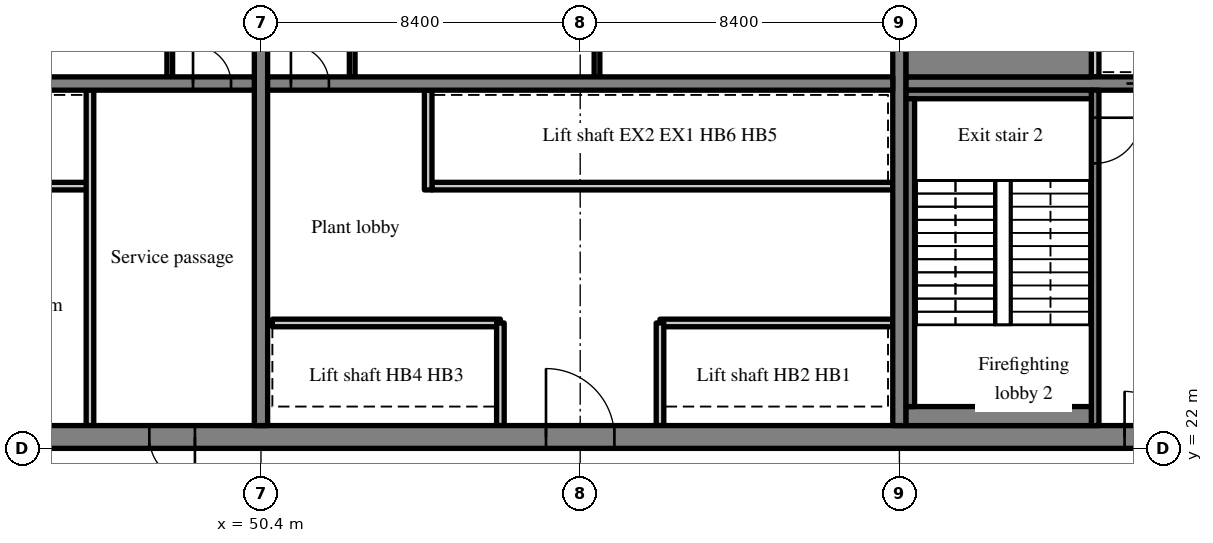
"""IFC4 building model, lengths in metres.
Left out: names, types, materials, properties, quantities, classifications, styles, units other than length and angle.
Written with IfcOpenShell. Run it as: python <this file> out.ifc"""

import sys

from ifc_helpers import new_model, si_unit, direction, frame, frame_2d, origin, place, context, subcontext, project, spatial, rectangle, extrude, source, transform, mapped, element, fill, save


model = new_model("IFC4")
c1 = context("Model", 3, precision=1e-05, world=origin(), true_north=direction((0.0, 1.0)))
c2 = subcontext(c1, "Body", "Model", "MODEL_VIEW")
j1 = project(units=[si_unit("LENGTHUNIT", "METRE"), si_unit("PLANEANGLEUNIT", "RADIAN")], contexts=[c1])
p1 = place(None, origin())
s1 = spatial("IfcSite", under=j1, at=p1, CompositionType="ELEMENT")
p2 = place(p1, origin())
s2 = spatial("IfcBuilding", under=s1, at=p2, CompositionType="ELEMENT")
p3 = place(p2, frame((0.0, 0.0, 264.7)))
s3 = spatial("IfcBuildingStorey", under=s2, at=p3, CompositionType="ELEMENT", Elevation=264.7)
m1 = source(origin(), c2, "Body", "SweptSolid", [
    extrude(rectangle(XDim=50.4, YDim=0.6, at=frame_2d((25.2, 0.0))), origin(), (0.0, 0.0, 1.0), 5.12),
])
p4 = place(p3, frame((25.2, 22.3, 0.0), z_axis=(0.0, 0.0, 1.0), x_axis=(1.0, 0.0, 0.0)))
e1 = element("IfcWall", 1, at=p4, inside=s3, PredefinedType="SHEAR", context=c2, shape_type="MappedRepresentation", body=[
    mapped(m1, transform((0.0, 0.0, 0.0), scale=1.0)),
])
m2 = source(origin(), c2, "Body", "SweptSolid", [
    extrude(rectangle(XDim=1.2, YDim=2.1, at=frame_2d((0.6, 1.05))), frame((0.0, 0.31, 0.0), z_axis=(0.0, -1.0, 0.0), x_axis=(1.0, 0.0, 0.0)), (0.0, 0.0, 1.0), 0.62),
])
p5 = place(p4, frame((22.262, 0.0, 0.0)))
e2 = element("IfcOpeningElement", 2, at=p5, cuts=e1, PredefinedType="OPENING", context=c2, shape_type="MappedRepresentation", body=[
    mapped(m2, transform((0.0, 0.0, 0.0), scale=1.0)),
])
m3 = source(origin(), c2, "Body", "SweptSolid", [
    extrude(rectangle(XDim=0.9, YDim=2.1, at=frame_2d((0.45, 1.05))), frame((0.0, 0.31, 0.0), z_axis=(0.0, -1.0, 0.0), x_axis=(1.0, 0.0, 0.0)), (0.0, 0.0, 1.0), 0.62),
])
p6 = place(p4, frame((17.25, 0.0, 0.0)))
e3 = element("IfcOpeningElement", 3, at=p6, cuts=e1, PredefinedType="OPENING", context=c2, shape_type="MappedRepresentation", body=[
    mapped(m3, transform((0.0, 0.0, 0.0), scale=1.0)),
])
p7 = place(p4, frame((9.656, 0.0, 0.0)))
e4 = element("IfcOpeningElement", 4, at=p7, cuts=e1, PredefinedType="OPENING", context=c2, shape_type="MappedRepresentation", body=[
    mapped(m3, transform((0.0, 0.0, 0.0), scale=1.0)),
])
p8 = place(p4, frame((12.719, 0.0, 0.0)))
e5 = element("IfcOpeningElement", 5, at=p8, cuts=e1, PredefinedType="OPENING", context=c2, shape_type="MappedRepresentation", body=[
    mapped(m3, transform((0.0, 0.0, 0.0), scale=1.0)),
])
m4 = source(origin(), c2, "Body", "SweptSolid", [
    extrude(rectangle(XDim=1.8, YDim=2.1, at=frame_2d((0.9, 1.05))), frame((0.0, 0.31, 0.0), z_axis=(0.0, -1.0, 0.0), x_axis=(1.0, 0.0, 0.0)), (0.0, 0.0, 1.0), 0.62),
])
p9 = place(p4, frame((32.7, 0.0, 0.0)))
e6 = element("IfcOpeningElement", 6, at=p9, cuts=e1, PredefinedType="OPENING", context=c2, shape_type="MappedRepresentation", body=[
    mapped(m4, transform((0.0, 0.0, 0.0), scale=1.0)),
])
p10 = place(p4, frame((6.488, 0.0, 0.0)))
e7 = element("IfcOpeningElement", 7, at=p10, cuts=e1, PredefinedType="OPENING", context=c2, shape_type="MappedRepresentation", body=[
    mapped(m2, transform((0.0, 0.0, 0.0), scale=1.0)),
])
p11 = place(p4, frame((47.925, 0.0, 0.0)))
e8 = element("IfcOpeningElement", 8, at=p11, cuts=e1, PredefinedType="OPENING", context=c2, shape_type="MappedRepresentation", body=[
    mapped(m2, transform((0.0, 0.0, 0.0), scale=1.0)),
])
m5 = source(origin(), c2, "Body", "SweptSolid", [
    extrude(rectangle(XDim=18.8, YDim=0.35, at=frame_2d((9.4, 0.0))), origin(), (0.0, 0.0, 1.0), 5.12),
])
p12 = place(p3, frame((50.4, 22.6, 0.0), z_axis=(0.0, 0.0, 1.0), x_axis=(0.0, 1.0, 0.0)))
e9 = element("IfcWall", 9, at=p12, inside=s3, PredefinedType="SHEAR", context=c2, shape_type="MappedRepresentation", body=[
    mapped(m5, transform((0.0, 0.0, 0.0), scale=1.0)),
])
m6 = source(origin(), c2, "Body", "SweptSolid", [
    extrude(rectangle(XDim=1.1, YDim=2.1, at=frame_2d((0.55, 1.05))), frame((0.0, 0.185, 0.0), z_axis=(0.0, -1.0, 0.0), x_axis=(1.0, 0.0, 0.0)), (0.0, 0.0, 1.0), 0.37),
])
p13 = place(p12, frame((12.85, 0.0, 0.0)))
e10 = element("IfcOpeningElement", 10, at=p13, cuts=e9, PredefinedType="OPENING", context=c2, shape_type="MappedRepresentation", body=[
    mapped(m6, transform((0.0, 0.0, 0.0), scale=1.0)),
])
p14 = place(p3, frame((67.2, 22.6, 0.0), z_axis=(0.0, 0.0, 1.0), x_axis=(0.0, 1.0, 0.0)))
e11 = element("IfcWall", 11, at=p14, inside=s3, PredefinedType="SHEAR", context=c2, shape_type="MappedRepresentation", body=[
    mapped(m5, transform((0.0, 0.0, 0.0), scale=1.0)),
])
m7 = source(origin(), c2, "Body", "SweptSolid", [
    extrude(rectangle(XDim=16.45, YDim=0.35, at=frame_2d((8.225, 0.0))), origin(), (0.0, 0.0, 1.0), 5.12),
])
p15 = place(p3, frame((33.775, 31.6, 0.0), z_axis=(0.0, 0.0, 1.0), x_axis=(1.0, 0.0, 0.0)))
e12 = element("IfcWall", 12, at=p15, inside=s3, PredefinedType="SHEAR", context=c2, shape_type="MappedRepresentation", body=[
    mapped(m7, transform((0.0, 0.0, 0.0), scale=1.0)),
])
m8 = source(origin(), c2, "Body", "SweptSolid", [
    extrude(rectangle(XDim=1.0, YDim=2.1, at=frame_2d((0.5, 1.05))), frame((0.0, 0.185, 0.0), z_axis=(0.0, -1.0, 0.0), x_axis=(1.0, 0.0, 0.0)), (0.0, 0.0, 1.0), 0.37),
])
p16 = place(p15, frame((14.837, 0.0, 0.0)))
e13 = element("IfcOpeningElement", 13, at=p16, cuts=e12, PredefinedType="OPENING", context=c2, shape_type="MappedRepresentation", body=[
    mapped(m8, transform((0.0, 0.0, 0.0), scale=1.0)),
])
m9 = source(origin(), c2, "Body", "SweptSolid", [
    extrude(rectangle(XDim=16.45, YDim=0.35, at=frame_2d((8.225, 0.0))), origin(), (0.0, 0.0, 1.0), 5.12),
])
p17 = place(p3, frame((50.575, 31.6, 0.0), z_axis=(0.0, 0.0, 1.0), x_axis=(1.0, 0.0, 0.0)))
e14 = element("IfcWall", 14, at=p17, inside=s3, PredefinedType="SHEAR", context=c2, shape_type="MappedRepresentation", body=[
    mapped(m9, transform((0.0, 0.0, 0.0), scale=1.0)),
])
p18 = place(p17, frame((0.613, 0.0, 0.0)))
e15 = element("IfcOpeningElement", 15, at=p18, cuts=e14, PredefinedType="OPENING", context=c2, shape_type="MappedRepresentation", body=[
    mapped(m8, transform((0.0, 0.0, 0.0), scale=1.0)),
])
m10 = source(origin(), c2, "Body", "SweptSolid", [
    extrude(rectangle(XDim=7.625, YDim=0.35, at=frame_2d((3.812, 0.0))), origin(), (0.0, 0.0, 1.0), 5.12),
])
p19 = place(p3, frame((67.375, 31.6, 0.0), z_axis=(0.0, 0.0, 1.0), x_axis=(1.0, 0.0, 0.0)))
e16 = element("IfcWall", 16, at=p19, inside=s3, PredefinedType="SHEAR", context=c2, shape_type="MappedRepresentation", body=[
    mapped(m10, transform((0.0, 0.0, 0.0), scale=1.0)),
])
p20 = place(p19, frame((5.8, 0.0, 0.0)))
e17 = element("IfcOpeningElement", 17, at=p20, cuts=e16, PredefinedType="OPENING", context=c2, shape_type="MappedRepresentation", body=[
    mapped(m6, transform((0.0, 0.0, 0.0), scale=1.0)),
])
m11 = source(origin(), c2, "Body", "SweptSolid", [
    extrude(rectangle(XDim=6.0, YDim=0.2, at=frame_2d((3.0, 0.0))), origin(), (0.0, 0.0, 1.0), 5.12),
])
p21 = place(p3, frame((39.9, 28.9, 0.0), z_axis=(0.0, 0.0, 1.0), x_axis=(1.0, 0.0, 0.0)))
e18 = element("IfcWall", 18, at=p21, inside=s3, PredefinedType="SOLIDWALL", context=c2, shape_type="MappedRepresentation", body=[
    mapped(m11, transform((0.0, 0.0, 0.0), scale=1.0)),
])
m12 = source(origin(), c2, "Body", "SweptSolid", [
    extrude(rectangle(XDim=8.825, YDim=0.2, at=frame_2d((4.413, 0.0))), origin(), (0.0, 0.0, 1.0), 5.12),
])
p22 = place(p3, frame((45.9, 22.6, 0.0), z_axis=(0.0, 0.0, 1.0), x_axis=(0.0, 1.0, 0.0)))
e19 = element("IfcWall", 19, at=p22, inside=s3, PredefinedType="PARTITIONING", context=c2, shape_type="MappedRepresentation", body=[
    mapped(m12, transform((0.0, 0.0, 0.0), scale=1.0)),
])
m13 = source(origin(), c2, "Body", "SweptSolid", [
    extrude(rectangle(XDim=3.225, YDim=0.15, at=frame_2d((1.613, 0.0))), origin(), (0.0, 0.0, 1.0), 5.12),
])
p23 = place(p3, frame((48.0, 31.775, 0.0), z_axis=(0.0, 0.0, 1.0), x_axis=(0.0, 1.0, 0.0)))
e20 = element("IfcWall", 20, at=p23, inside=s3, PredefinedType="PARTITIONING", context=c2, shape_type="MappedRepresentation", body=[
    mapped(m13, transform((0.0, 0.0, 0.0), scale=1.0)),
])
m14 = source(origin(), c2, "Body", "SweptSolid", [
    extrude(rectangle(XDim=6.125, YDim=0.2, at=frame_2d((3.062, 0.0))), origin(), (0.0, 0.0, 1.0), 5.12),
])
p24 = place(p3, frame((67.025, 25.3, 0.0), z_axis=(0.0, 0.0, 1.0), x_axis=(-1.0, 0.0, 0.0)))
e21 = element("IfcWall", 21, at=p24, inside=s3, PredefinedType="SOLIDWALL", context=c2, shape_type="MappedRepresentation", body=[
    mapped(m14, transform((0.0, 0.0, 0.0), scale=1.0)),
])
p25 = place(p3, frame((56.7, 25.3, 0.0), z_axis=(0.0, 0.0, 1.0), x_axis=(-1.0, 0.0, 0.0)))
e22 = element("IfcWall", 22, at=p25, inside=s3, PredefinedType="SOLIDWALL", context=c2, shape_type="MappedRepresentation", body=[
    mapped(m11, transform((0.0, 0.0, 0.0), scale=1.0)),
])
m15 = source(origin(), c2, "Body", "SweptSolid", [
    extrude(rectangle(XDim=12.125, YDim=0.2, at=frame_2d((6.062, 0.0))), origin(), (0.0, 0.0, 1.0), 5.12),
])
p26 = place(p3, frame((67.025, 28.9, 0.0), z_axis=(0.0, 0.0, 1.0), x_axis=(-1.0, 0.0, 0.0)))
e23 = element("IfcWall", 23, at=p26, inside=s3, PredefinedType="SOLIDWALL", context=c2, shape_type="MappedRepresentation", body=[
    mapped(m15, transform((0.0, 0.0, 0.0), scale=1.0)),
])
m16 = source(origin(), c2, "Body", "SweptSolid", [
    extrude(rectangle(XDim=2.7, YDim=0.2, at=frame_2d((1.35, 0.0))), origin(), (0.0, 0.0, 1.0), 5.12),
])
for number, where, z_axis, x_axis in (
    (24, (60.9, 22.6, 0.0), (0.0, 0.0, 1.0), (0.0, 1.0, 0.0)),
    (25, (56.7, 22.6, 0.0), (0.0, 0.0, 1.0), (0.0, 1.0, 0.0)),
):
    element("IfcWall", number, at=place(p3, frame(where, z_axis=z_axis, x_axis=x_axis)), inside=s3, PredefinedType="SOLIDWALL", context=c2, shape_type="MappedRepresentation", body=[
        mapped(m16, transform((0.0, 0.0, 0.0), scale=1.0)),
    ])
m17 = source(origin(), c2, "Body", "SweptSolid", [
    extrude(rectangle(XDim=2.625, YDim=0.2, at=frame_2d((1.312, 0.0))), origin(), (0.0, 0.0, 1.0), 5.12),
])
p27 = place(p3, frame((54.8, 28.8, 0.0), z_axis=(0.0, 0.0, 1.0), x_axis=(0.0, 1.0, 0.0)))
e26 = element("IfcWall", 26, at=p27, inside=s3, PredefinedType="SOLIDWALL", context=c2, shape_type="MappedRepresentation", body=[
    mapped(m17, transform((0.0, 0.0, 0.0), scale=1.0)),
])
for number, where, z_axis, x_axis in (
    (27, (52.8, 31.775, 0.0), (0.0, 0.0, 1.0), (0.0, 1.0, 0.0)),
    (28, (59.242, 31.775, 0.0), (0.0, 0.0, 1.0), (0.0, 1.0, 0.0)),
):
    element("IfcWall", number, at=place(p3, frame(where, z_axis=z_axis, x_axis=x_axis)), inside=s3, PredefinedType="PARTITIONING", context=c2, shape_type="MappedRepresentation", body=[
        mapped(m13, transform((0.0, 0.0, 0.0), scale=1.0)),
    ])
m18 = source(origin(), c2, "Body", "SweptSolid", [
    extrude(rectangle(XDim=8.825, YDim=0.2, at=frame_2d((4.413, 0.0))), origin(), (0.0, 0.0, 1.0), 5.12),
])
p28 = place(p3, frame((72.35, 22.6, 0.0), z_axis=(0.0, 0.0, 1.0), x_axis=(0.0, 1.0, 0.0)))
e29 = element("IfcWall", 29, at=p28, inside=s3, PredefinedType="SOLIDWALL", context=c2, shape_type="MappedRepresentation", body=[
    mapped(m18, transform((0.0, 0.0, 0.0), scale=1.0)),
])
m19 = source(origin(), c2, "Body", "SweptSolid", [
    extrude(rectangle(XDim=1.2, YDim=2.1, at=frame_2d((0.6, 1.05))), frame((0.0, 0.11, 0.0), z_axis=(0.0, -1.0, 0.0), x_axis=(1.0, 0.0, 0.0)), (0.0, 0.0, 1.0), 0.22),
])
p29 = place(p28, frame((6.9, 0.0, 0.0)))
e30 = element("IfcOpeningElement", 30, at=p29, cuts=e29, PredefinedType="OPENING", context=c2, shape_type="MappedRepresentation", body=[
    mapped(m19, transform((0.0, 0.0, 0.0), scale=1.0)),
])
m20 = source(origin(), c2, "Body", "SweptSolid", [
    extrude(rectangle(XDim=1.825, YDim=0.2, at=frame_2d((0.913, 0.0))), origin(), (0.0, 0.0, 1.0), 5.12),
])
p30 = place(p3, frame((72.35, 31.775, 0.0), z_axis=(0.0, 0.0, 1.0), x_axis=(0.0, 1.0, 0.0)))
e31 = element("IfcWall", 31, at=p30, inside=s3, PredefinedType="SOLIDWALL", context=c2, shape_type="MappedRepresentation", body=[
    mapped(m20, transform((0.0, 0.0, 0.0), scale=1.0)),
])
m21 = source(origin(), c2, "Body", "SweptSolid", [
    extrude(rectangle(XDim=4.875, YDim=0.5, at=frame_2d((2.438, 0.0))), origin(), (0.0, 0.0, 1.0), 5.12),
])
p31 = place(p3, frame((67.375, 22.85, 0.0), z_axis=(0.0, 0.0, 1.0), x_axis=(1.0, 0.0, 0.0)))
e32 = element("IfcWall", 32, at=p31, inside=s3, PredefinedType="SOLIDWALL", context=c2, shape_type="MappedRepresentation", body=[
    mapped(m21, transform((0.0, 0.0, 0.0), scale=1.0)),
])
m22 = source(origin(), c2, "Body", "SweptSolid", [
    extrude(rectangle(XDim=4.875, YDim=0.225, at=frame_2d((2.438, 0.0))), origin(), (0.0, 0.0, 1.0), 5.12),
])
p32 = place(p3, frame((67.375, 31.312, 0.0), z_axis=(0.0, 0.0, 1.0), x_axis=(1.0, 0.0, 0.0)))
e33 = element("IfcWall", 33, at=p32, inside=s3, PredefinedType="SOLIDWALL", context=c2, shape_type="MappedRepresentation", body=[
    mapped(m22, transform((0.0, 0.0, 0.0), scale=1.0)),
])
m23 = source(origin(), c2, "Body", "SweptSolid", [
    extrude(rectangle(XDim=8.1, YDim=0.225, at=frame_2d((4.05, 0.0))), origin(), (0.0, 0.0, 1.0), 5.12),
])
p33 = place(p3, frame((67.487, 23.1, 0.0), z_axis=(0.0, 0.0, 1.0), x_axis=(0.0, 1.0, 0.0)))
e34 = element("IfcWall", 34, at=p33, inside=s3, PredefinedType="SOLIDWALL", context=c2, shape_type="MappedRepresentation", body=[
    mapped(m23, transform((0.0, 0.0, 0.0), scale=1.0)),
])
m24 = source(origin(), c2, "Body", "SweptSolid", [
    extrude(rectangle(XDim=4.875, YDim=1.025, at=frame_2d((2.438, 0.0))), origin(), (0.0, 0.0, 1.0), 5.12),
])
p34 = place(p3, frame((67.375, 32.287, 0.0), z_axis=(0.0, 0.0, 1.0), x_axis=(1.0, 0.0, 0.0)))
e35 = element("IfcWall", 35, at=p34, inside=s3, PredefinedType="SOLIDWALL", context=c2, shape_type="MappedRepresentation", body=[
    mapped(m24, transform((0.0, 0.0, 0.0), scale=1.0)),
])
m25 = source(origin(), c2, "Body", "SweptSolid", [
    extrude(rectangle(XDim=1.2, YDim=2.1, at=frame_2d((0.6, 1.05))), frame((0.0, 0.225, 0.0), z_axis=(0.0, -1.0, 0.0), x_axis=(1.0, 0.0, 0.0)), (0.0, 0.0, 1.0), 0.05),
])
p35 = place(p5, origin())
e36 = element("IfcDoor", 36, at=p35, inside=s3, OperationType="SINGLE_SWING_RIGHT", PredefinedType="DOOR", context=c2, shape_type="MappedRepresentation", body=[
    mapped(m25, transform((0.0, 0.0, 0.0), scale=1.0)),
])
fill(e2, e36)
m26 = source(origin(), c2, "Body", "SweptSolid", [
    extrude(rectangle(XDim=1.0, YDim=2.1, at=frame_2d((0.5, 1.05))), frame((0.0, 0.025, 0.0), z_axis=(0.0, -1.0, 0.0), x_axis=(1.0, 0.0, 0.0)), (0.0, 0.0, 1.0), 0.05),
])
p36 = place(p16, origin())
e37 = element("IfcDoor", 37, at=p36, inside=s3, OperationType="SINGLE_SWING_LEFT", PredefinedType="DOOR", context=c2, shape_type="MappedRepresentation", body=[
    mapped(m26, transform((0.0, 0.0, 0.0), scale=1.0)),
])
fill(e13, e37)
m27 = source(origin(), c2, "Body", "SweptSolid", [
    extrude(rectangle(XDim=1.8, YDim=2.1, at=frame_2d((0.9, 1.05))), frame((0.0, 0.225, 0.0), z_axis=(0.0, -1.0, 0.0), x_axis=(1.0, 0.0, 0.0)), (0.0, 0.0, 1.0), 0.05),
])
p37 = place(p9, origin())
e38 = element("IfcDoor", 38, at=p37, inside=s3, OperationType="DOUBLE_DOOR_SINGLE_SWING", PredefinedType="DOOR", context=c2, shape_type="MappedRepresentation", body=[
    mapped(m27, transform((0.0, 0.0, 0.0), scale=1.0)),
])
fill(e6, e38)
p38 = place(p18, origin())
e39 = element("IfcDoor", 39, at=p38, inside=s3, OperationType="SINGLE_SWING_LEFT", PredefinedType="DOOR", context=c2, shape_type="MappedRepresentation", body=[
    mapped(m26, transform((0.0, 0.0, 0.0), scale=1.0)),
])
fill(e15, e39)
m28 = source(origin(), c2, "Body", "SweptSolid", [
    extrude(rectangle(XDim=1.2, YDim=2.1, at=frame_2d((0.6, 1.05))), frame((0.0, 0.025, 0.0), z_axis=(0.0, -1.0, 0.0), x_axis=(1.0, 0.0, 0.0)), (0.0, 0.0, 1.0), 0.05),
])
p39 = place(p29, origin())
e40 = element("IfcDoor", 40, at=p39, inside=s3, OperationType="SINGLE_SWING_RIGHT", PredefinedType="DOOR", context=c2, shape_type="MappedRepresentation", body=[
    mapped(m28, transform((0.0, 0.0, 0.0), scale=1.0)),
])
fill(e30, e40)
p40 = place(p11, origin())
e41 = element("IfcDoor", 41, at=p40, inside=s3, OperationType="SINGLE_SWING_LEFT", PredefinedType="DOOR", context=c2, shape_type="MappedRepresentation", body=[
    mapped(m25, transform((0.0, 0.0, 0.0), scale=1.0)),
])
fill(e8, e41)
m29 = source(origin(), c2, "Body", "SweptSolid", [
    extrude(rectangle(XDim=1.1, YDim=2.1, at=frame_2d((0.55, 1.05))), frame((0.0, 0.025, 0.0), z_axis=(0.0, -1.0, 0.0), x_axis=(1.0, 0.0, 0.0)), (0.0, 0.0, 1.0), 0.05),
])
p41 = place(p20, origin())
e42 = element("IfcDoor", 42, at=p41, inside=s3, OperationType="SLIDING_TO_LEFT", PredefinedType="DOOR", context=c2, shape_type="MappedRepresentation", body=[
    mapped(m29, transform((0.0, 0.0, 0.0), scale=1.0)),
])
fill(e17, e42)
save(model, sys.argv[1])
